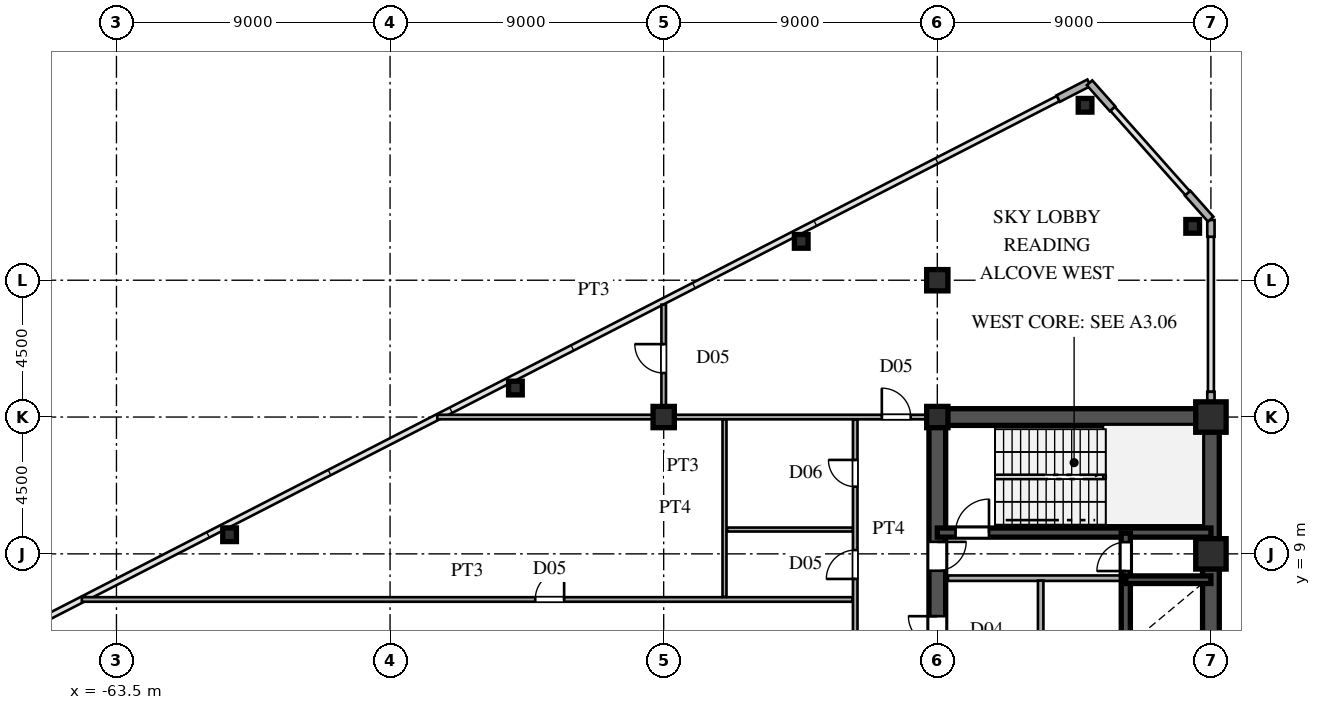
"""IFC4 building model, lengths in metres.
Left out: names, types, materials, properties, quantities, classifications, styles, units other than length and angle.
Written with IfcOpenShell. Run it as: python <this file> out.ifc"""

import sys

from ifc_helpers import new_model, si_unit, direction, frame, frame_2d, origin, origin_2d, place, context, subcontext, project, spatial, rectangle, hollow_rectangle, i_section, extrude, source, transform, mapped, element, fill, save


model = new_model("IFC4")
c1 = context("Model", 3, precision=1e-05, world=origin(), true_north=direction((0.0, 1.0)))
c2 = subcontext(c1, "Body", "Model", "MODEL_VIEW")
j1 = project(units=[si_unit("LENGTHUNIT", "METRE"), si_unit("PLANEANGLEUNIT", "RADIAN")], contexts=[c1])
p1 = place(None, origin())
s1 = spatial("IfcSite", under=j1, at=p1, CompositionType="ELEMENT")
p2 = place(p1, origin())
s2 = spatial("IfcBuilding", under=s1, at=p2, CompositionType="ELEMENT")
p3 = place(p2, frame((0.0, 0.0, 135.6)))
s3 = spatial("IfcBuildingStorey", under=s2, at=p3, CompositionType="ELEMENT", Elevation=135.6)
m1 = source(origin(), c2, "Body", "SweptSolid", [
    extrude(hollow_rectangle(XDim=1.0, YDim=1.0, WallThickness=0.042, at=origin_2d()), origin(), (0.0, 0.0, 1.0), 4.8),
])
for number, where, z_axis, x_axis in (
    (1, (-27.5, 9.0, 0.0), (0.0, 0.0, 1.0), (1.0, 0.0, 0.0)),
    (2, (-27.5, 13.5, 0.0), (0.0, 0.0, 1.0), (1.0, 0.0, 0.0)),
):
    element("IfcColumn", number, at=place(p3, frame(where, z_axis=z_axis, x_axis=x_axis)), inside=s3, PredefinedType="COLUMN", context=c2, shape_type="MappedRepresentation", body=[
        mapped(m1, transform((0.0, 0.0, 0.0), scale=1.0)),
    ])
m2 = source(origin(), c2, "Body", "SweptSolid", [
    extrude(i_section(OverallWidth=0.7, OverallDepth=0.7, WebThickness=0.028, FlangeThickness=0.045, at=origin_2d()), origin(), (0.0, 0.0, 1.0), 4.8),
])
for number, where, z_axis, x_axis in (
    (3, (-36.5, 13.5, 0.0), (0.0, 0.0, 1.0), (1.0, 0.0, 0.0)),
    (4, (-36.5, 18.0, 0.0), (0.0, 0.0, 1.0), (1.0, 0.0, 0.0)),
    (5, (-45.5, 13.5, 0.0), (0.0, 0.0, 1.0), (1.0, 0.0, 0.0)),
):
    element("IfcColumn", number, at=place(p3, frame(where, z_axis=z_axis, x_axis=x_axis)), inside=s3, PredefinedType="COLUMN", context=c2, shape_type="MappedRepresentation", body=[
        mapped(m2, transform((0.0, 0.0, 0.0), scale=1.0)),
    ])
m3 = source(origin(), c2, "Body", "SweptSolid", [
    extrude(hollow_rectangle(XDim=0.45, YDim=0.45, WallThickness=0.018, at=origin_2d()), origin(), (0.0, 0.0, 1.0), 4.8),
])
for number, where, z_axis, x_axis in (
    (6, (-28.1, 19.772, 0.0), (0.0, 0.0, 1.0), (1.0, 0.0, 0.0)),
    (7, (-31.64, 23.754, 0.0), (0.0, 0.0, 1.0), (1.0, 0.0, 0.0)),
    (8, (-40.976, 19.278, 0.0), (0.0, 0.0, 1.0), (1.0, 0.0, 0.0)),
    (9, (-50.377, 14.453, 0.0), (0.0, 0.0, 1.0), (1.0, 0.0, 0.0)),
    (10, (-59.779, 9.629, 0.0), (0.0, 0.0, 1.0), (1.0, 0.0, 0.0)),
):
    element("IfcColumn", number, at=place(p3, frame(where, z_axis=z_axis, x_axis=x_axis)), inside=s3, PredefinedType="COLUMN", context=c2, shape_type="MappedRepresentation", body=[
        mapped(m3, transform((0.0, 0.0, 0.0), scale=1.0)),
    ])
p4 = place(p3, frame((-27.5, 13.78, 0.0), z_axis=(0.0, 0.0, 1.0), x_axis=(0.0, 1.0, 0.0)))
e11 = element("IfcWall", 11, at=p4, inside=s3, PredefinedType="SOLIDWALL", context=c2, shape_type="SweptSolid", body=[
    extrude(rectangle(XDim=0.55, YDim=0.24, at=frame_2d((0.275, 0.0))), origin(), (0.0, 0.0, 1.0), 4.08),
])
p5 = place(p3, frame((-27.5, 19.43, 0.0), z_axis=(0.0, 0.0, 1.0), x_axis=(0.0, 1.0, 0.0)))
e12 = element("IfcWall", 12, at=p5, inside=s3, PredefinedType="SOLIDWALL", context=c2, shape_type="SweptSolid", body=[
    extrude(rectangle(XDim=0.55, YDim=0.24, at=frame_2d((0.275, 0.0))), origin(), (0.0, 0.0, 1.0), 4.58),
])
for number, where, z_axis, x_axis in (
    (13, (-27.507, 20.008, 0.0), (0.0, 0.0, 1.0), (-0.664, 0.747, 0.0)),
    (14, (-30.736, 23.64, 0.0), (0.0, 0.0, 1.0), (-0.664, 0.747, 0.0)),
):
    element("IfcWall", number, at=place(p3, frame(where, z_axis=z_axis, x_axis=x_axis)), inside=s3, PredefinedType="SOLIDWALL", context=c2, shape_type="SweptSolid", body=[
        extrude(rectangle(XDim=1.14, YDim=0.24, at=frame_2d((0.57, 0.0))), origin(), (0.0, 0.0, 1.0), 4.58),
    ])
p6 = place(p3, frame((-31.509, 24.495, 0.0), z_axis=(0.0, 0.0, 1.0), x_axis=(-0.889797395748, -0.456355776255, 0.0)))
e15 = element("IfcWall", 15, at=p6, inside=s3, PredefinedType="SOLIDWALL", context=c2, shape_type="SweptSolid", body=[
    extrude(rectangle(XDim=1.14, YDim=0.24, at=frame_2d((0.57, 0.0))), origin(), (0.0, 0.0, 1.0), 4.58),
])
p7 = place(p3, frame((-27.5, 1.3, 0.0), z_axis=(0.0, 0.0, 1.0), x_axis=(0.0, 1.0, 0.0)))
e16 = element("IfcWall", 16, at=p7, inside=s3, PredefinedType="SHEAR", context=c2, shape_type="SweptSolid", body=[
    extrude(rectangle(XDim=12.2, YDim=0.55, at=frame_2d((6.1, 0.0))), origin(), (0.0, 0.0, 1.0), 4.58),
])
p8 = place(p3, frame((-36.5, 13.5, 0.0), z_axis=(0.0, 0.0, 1.0), x_axis=(1.0, 0.0, 0.0)))
e17 = element("IfcWall", 17, at=p8, inside=s3, PredefinedType="SHEAR", context=c2, shape_type="SweptSolid", body=[
    extrude(rectangle(XDim=9.0, YDim=0.55, at=frame_2d((4.5, 0.0))), origin(), (0.0, 0.0, 1.0), 4.58),
])
p9 = place(p3, frame((-36.5, 8.2, 0.0), z_axis=(0.0, 0.0, 1.0), x_axis=(0.0, 1.0, 0.0)))
e18 = element("IfcWall", 18, at=p9, inside=s3, PredefinedType="SHEAR", context=c2, shape_type="SweptSolid", body=[
    extrude(rectangle(XDim=5.45, YDim=0.55, at=frame_2d((2.725, 0.0))), origin(), (0.0, 0.0, 1.0), 4.58),
])
p10 = place(p9, frame((0.245, 0.0, 0.0)))
e19 = element("IfcOpeningElement", 19, at=p10, cuts=e18, PredefinedType="OPENING", context=c2, shape_type="SweptSolid", body=[
    extrude(rectangle(XDim=0.95, YDim=2.15, at=frame_2d((0.475, 1.075))), frame((0.0, 0.285, 0.0), z_axis=(0.0, -1.0, 0.0), x_axis=(1.0, 0.0, 0.0)), (0.0, 0.0, 1.0), 0.57),
])
p11 = place(p3, frame((-36.5, 4.75, 0.0), z_axis=(0.0, 0.0, 1.0), x_axis=(0.0, 1.0, 0.0)))
e20 = element("IfcWall", 20, at=p11, inside=s3, PredefinedType="SHEAR", context=c2, shape_type="SweptSolid", body=[
    extrude(rectangle(XDim=3.45, YDim=0.55, at=frame_2d((1.725, 0.0))), origin(), (0.0, 0.0, 1.0), 4.58),
])
p12 = place(p11, frame((1.25, 0.0, 0.0)))
e21 = element("IfcOpeningElement", 21, at=p12, cuts=e20, PredefinedType="OPENING", context=c2, shape_type="SweptSolid", body=[
    extrude(rectangle(XDim=0.95, YDim=2.15, at=frame_2d((0.475, 1.075))), frame((0.0, 0.285, 0.0), z_axis=(0.0, -1.0, 0.0), x_axis=(1.0, 0.0, 0.0)), (0.0, 0.0, 1.0), 0.57),
])
p13 = place(p3, frame((-36.5, 9.7, 0.0), z_axis=(0.0, 0.0, 1.0), x_axis=(1.0, 0.0, 0.0)))
e22 = element("IfcWall", 22, at=p13, inside=s3, PredefinedType="SHEAR", context=c2, shape_type="SweptSolid", body=[
    extrude(rectangle(XDim=9.0, YDim=0.3, at=frame_2d((4.5, 0.0))), origin(), (0.0, 0.0, 1.0), 4.58),
])
p14 = place(p13, frame((0.6, 0.0, 0.0)))
e23 = element("IfcOpeningElement", 23, at=p14, cuts=e22, PredefinedType="OPENING", context=c2, shape_type="SweptSolid", body=[
    extrude(rectangle(XDim=1.1, YDim=2.2, at=frame_2d((0.55, 1.1))), frame((0.0, 0.16, 0.0), z_axis=(0.0, -1.0, 0.0), x_axis=(1.0, 0.0, 0.0)), (0.0, 0.0, 1.0), 0.32),
])
p15 = place(p3, frame((-30.3, 8.15, 0.0), z_axis=(0.0, 0.0, 1.0), x_axis=(1.0, 0.0, 0.0)))
e24 = element("IfcWall", 24, at=p15, inside=s3, PredefinedType="SHEAR", context=c2, shape_type="SweptSolid", body=[
    extrude(rectangle(XDim=2.8, YDim=0.25, at=frame_2d((1.4, 0.0))), origin(), (0.0, 0.0, 1.0), 4.58),
])
p16 = place(p3, frame((-30.3, 5.9, 0.0), z_axis=(0.0, 0.0, 1.0), x_axis=(0.0, 1.0, 0.0)))
e25 = element("IfcWall", 25, at=p16, inside=s3, PredefinedType="SHEAR", context=c2, shape_type="SweptSolid", body=[
    extrude(rectangle(XDim=2.25, YDim=0.3, at=frame_2d((1.125, 0.0))), origin(), (0.0, 0.0, 1.0), 4.58),
])
p17 = place(p3, frame((-30.3, 8.15, 0.0), z_axis=(0.0, 0.0, 1.0), x_axis=(0.0, 1.0, 0.0)))
e26 = element("IfcWall", 26, at=p17, inside=s3, PredefinedType="SHEAR", context=c2, shape_type="SweptSolid", body=[
    extrude(rectangle(XDim=1.53, YDim=0.3, at=frame_2d((0.765, 0.0))), origin(), (0.0, 0.0, 1.0), 4.58),
])
p18 = place(p17, frame((0.285, 0.0, 0.0)))
e27 = element("IfcOpeningElement", 27, at=p18, cuts=e26, PredefinedType="OPENING", context=c2, shape_type="SweptSolid", body=[
    extrude(rectangle(XDim=0.95, YDim=2.15, at=frame_2d((0.475, 1.075))), frame((0.0, 0.16, 0.0), z_axis=(0.0, -1.0, 0.0), x_axis=(1.0, 0.0, 0.0)), (0.0, 0.0, 1.0), 0.32),
])
p19 = place(p3, frame((-36.15, 8.2, 0.0), z_axis=(0.0, 0.0, 1.0), x_axis=(1.0, 0.0, 0.0)))
e28 = element("IfcWall", 28, at=p19, inside=s3, PredefinedType="PARTITIONING", context=c2, shape_type="SweptSolid", body=[
    extrude(rectangle(XDim=5.7, YDim=0.18, at=frame_2d((2.85, 0.0))), origin(), (0.0, 0.0, 1.0), 4.58),
])
p20 = place(p3, frame((-33.1, 1.38, 0.0), z_axis=(0.0, 0.0, 1.0), x_axis=(0.0, 1.0, 0.0)))
e29 = element("IfcWall", 29, at=p20, inside=s3, PredefinedType="PARTITIONING", context=c2, shape_type="SweptSolid", body=[
    extrude(rectangle(XDim=6.74, YDim=0.18, at=frame_2d((3.37, 0.0))), origin(), (0.0, 0.0, 1.0), 4.58),
])
p21 = place(p3, frame((-64.639, 7.5, 0.0), z_axis=(0.0, 0.0, 1.0), x_axis=(1.0, 0.0, 0.0)))
e30 = element("IfcWall", 30, at=p21, inside=s3, PredefinedType="PARTITIONING", context=c2, shape_type="SweptSolid", body=[
    extrude(rectangle(XDim=25.354, YDim=0.15, at=frame_2d((12.677, 0.0))), origin(), (0.0, 0.0, 1.0), 4.58),
])
p22 = place(p21, frame((14.914, 0.0, 0.0)))
e31 = element("IfcOpeningElement", 31, at=p22, cuts=e30, PredefinedType="OPENING", context=c2, shape_type="SweptSolid", body=[
    extrude(rectangle(XDim=0.95, YDim=2.15, at=frame_2d((0.475, 1.075))), frame((0.0, 0.085, 0.0), z_axis=(0.0, -1.0, 0.0), x_axis=(1.0, 0.0, 0.0)), (0.0, 0.0, 1.0), 0.17),
])
p23 = place(p3, frame((-43.415, 9.8, 0.0), z_axis=(0.0, 0.0, 1.0), x_axis=(1.0, 0.0, 0.0)))
e32 = element("IfcWall", 32, at=p23, inside=s3, PredefinedType="PARTITIONING", context=c2, shape_type="SweptSolid", body=[
    extrude(rectangle(XDim=4.13, YDim=0.13, at=frame_2d((2.065, 0.0))), origin(), (0.0, 0.0, 1.0), 4.58),
])
p24 = place(p3, frame((-52.947, 13.5, 0.0), z_axis=(0.0, 0.0, 1.0), x_axis=(1.0, 0.0, 0.0)))
e33 = element("IfcWall", 33, at=p24, inside=s3, PredefinedType="PARTITIONING", context=c2, shape_type="SweptSolid", body=[
    extrude(rectangle(XDim=16.167, YDim=0.15, at=frame_2d((8.083, 0.0))), origin(), (0.0, 0.0, 1.0), 3.98),
])
p25 = place(p24, frame((14.622, 0.0, 0.0)))
e34 = element("IfcOpeningElement", 34, at=p25, cuts=e33, PredefinedType="OPENING", context=c2, shape_type="SweptSolid", body=[
    extrude(rectangle(XDim=0.95, YDim=2.15, at=frame_2d((0.475, 1.075))), frame((0.0, 0.085, 0.0), z_axis=(0.0, -1.0, 0.0), x_axis=(1.0, 0.0, 0.0)), (0.0, 0.0, 1.0), 0.17),
])
p26 = place(p3, frame((-45.5, 13.585, 0.0), z_axis=(0.0, 0.0, 1.0), x_axis=(0.0, 1.0, 0.0)))
e35 = element("IfcWall", 35, at=p26, inside=s3, PredefinedType="PARTITIONING", context=c2, shape_type="SweptSolid", body=[
    extrude(rectangle(XDim=3.611, YDim=0.15, at=frame_2d((1.806, 0.0))), origin(), (0.0, 0.0, 1.0), 4.58),
])
p27 = place(p26, frame((1.363, 0.0, 0.0)))
e36 = element("IfcOpeningElement", 36, at=p27, cuts=e35, PredefinedType="OPENING", context=c2, shape_type="SweptSolid", body=[
    extrude(rectangle(XDim=0.95, YDim=2.15, at=frame_2d((0.475, 1.075))), frame((0.0, 0.085, 0.0), z_axis=(0.0, -1.0, 0.0), x_axis=(1.0, 0.0, 0.0)), (0.0, 0.0, 1.0), 0.17),
])
p28 = place(p3, frame((-43.5, 7.585, 0.0), z_axis=(0.0, 0.0, 1.0), x_axis=(0.0, 1.0, 0.0)))
e37 = element("IfcWall", 37, at=p28, inside=s3, PredefinedType="PARTITIONING", context=c2, shape_type="SweptSolid", body=[
    extrude(rectangle(XDim=5.83, YDim=0.13, at=frame_2d((2.915, 0.0))), origin(), (0.0, 0.0, 1.0), 4.58),
])
p29 = place(p3, frame((-39.2, -13.415, 0.0), z_axis=(0.0, 0.0, 1.0), x_axis=(0.0, 1.0, 0.0)))
e38 = element("IfcWall", 38, at=p29, inside=s3, PredefinedType="PARTITIONING", context=c2, shape_type="SweptSolid", body=[
    extrude(rectangle(XDim=26.83, YDim=0.15, at=frame_2d((13.415, 0.0))), origin(), (0.0, 0.0, 1.0), 4.58),
])
p30 = place(p29, frame((12.94, 0.0, 0.0)))
e39 = element("IfcOpeningElement", 39, at=p30, cuts=e38, PredefinedType="OPENING", context=c2, shape_type="SweptSolid", body=[
    extrude(rectangle(XDim=0.95, YDim=2.15, at=frame_2d((0.475, 1.075))), frame((0.0, 0.085, 0.0), z_axis=(0.0, -1.0, 0.0), x_axis=(1.0, 0.0, 0.0)), (0.0, 0.0, 1.0), 0.17),
])
p31 = place(p29, frame((1.325, 0.0, 0.0)))
e40 = element("IfcOpeningElement", 40, at=p31, cuts=e38, PredefinedType="OPENING", context=c2, shape_type="SweptSolid", body=[
    extrude(rectangle(XDim=0.88, YDim=2.1, at=frame_2d((0.44, 1.05))), frame((0.0, 0.085, 0.0), z_axis=(0.0, -1.0, 0.0), x_axis=(1.0, 0.0, 0.0)), (0.0, 0.0, 1.0), 0.17),
])
p32 = place(p29, frame((4.29, 0.0, 0.0)))
e41 = element("IfcOpeningElement", 41, at=p32, cuts=e38, PredefinedType="OPENING", context=c2, shape_type="SweptSolid", body=[
    extrude(rectangle(XDim=0.95, YDim=2.15, at=frame_2d((0.475, 1.075))), frame((0.0, 0.085, 0.0), z_axis=(0.0, -1.0, 0.0), x_axis=(1.0, 0.0, 0.0)), (0.0, 0.0, 1.0), 0.17),
])
p33 = place(p29, frame((21.59, 0.0, 0.0)))
e42 = element("IfcOpeningElement", 42, at=p33, cuts=e38, PredefinedType="OPENING", context=c2, shape_type="SweptSolid", body=[
    extrude(rectangle(XDim=0.95, YDim=2.15, at=frame_2d((0.475, 1.075))), frame((0.0, 0.085, 0.0), z_axis=(0.0, -1.0, 0.0), x_axis=(1.0, 0.0, 0.0)), (0.0, 0.0, 1.0), 0.17),
])
p34 = place(p29, frame((24.625, 0.0, 0.0)))
e43 = element("IfcOpeningElement", 43, at=p34, cuts=e38, PredefinedType="OPENING", context=c2, shape_type="SweptSolid", body=[
    extrude(rectangle(XDim=0.88, YDim=2.1, at=frame_2d((0.44, 1.05))), frame((0.0, 0.085, 0.0), z_axis=(0.0, -1.0, 0.0), x_axis=(1.0, 0.0, 0.0)), (0.0, 0.0, 1.0), 0.17),
])
m4 = source(origin(), c2, "Body", "SweptSolid", [
    extrude(rectangle(XDim=0.95, YDim=2.15, at=frame_2d((0.475, 1.075))), frame((0.0, 0.025, 0.0), z_axis=(0.0, -1.0, 0.0), x_axis=(1.0, 0.0, 0.0)), (0.0, 0.0, 1.0), 0.05),
])
p35 = place(p10, frame((0.95, 0.0, 0.0), z_axis=(0.0, 0.0, 1.0), x_axis=(-1.0, 0.0, 0.0)))
e44 = element("IfcDoor", 44, at=p35, inside=s3, OperationType="SINGLE_SWING_RIGHT", PredefinedType="DOOR", context=c2, shape_type="MappedRepresentation", body=[
    mapped(m4, transform((0.0, 0.0, 0.0), scale=1.0)),
])
fill(e19, e44)
p36 = place(p12, origin())
e45 = element("IfcDoor", 45, at=p36, inside=s3, OperationType="SINGLE_SWING_RIGHT", PredefinedType="DOOR", context=c2, shape_type="MappedRepresentation", body=[
    mapped(m4, transform((0.0, 0.0, 0.0), scale=1.0)),
])
fill(e21, e45)
m5 = source(origin(), c2, "Body", "SweptSolid", [
    extrude(rectangle(XDim=1.1, YDim=2.2, at=frame_2d((0.55, 1.1))), frame((0.0, 0.025, 0.0), z_axis=(0.0, -1.0, 0.0), x_axis=(1.0, 0.0, 0.0)), (0.0, 0.0, 1.0), 0.05),
])
p37 = place(p14, origin())
e46 = element("IfcDoor", 46, at=p37, inside=s3, OperationType="SINGLE_SWING_RIGHT", PredefinedType="DOOR", context=c2, shape_type="MappedRepresentation", body=[
    mapped(m5, transform((0.0, 0.0, 0.0), scale=1.0)),
])
fill(e23, e46)
p38 = place(p18, origin())
e47 = element("IfcDoor", 47, at=p38, inside=s3, OperationType="SINGLE_SWING_LEFT", PredefinedType="DOOR", context=c2, shape_type="MappedRepresentation", body=[
    mapped(m4, transform((0.0, 0.0, 0.0), scale=1.0)),
])
fill(e27, e47)
m6 = source(origin(), c2, "Body", "SweptSolid", [
    extrude(rectangle(XDim=0.95, YDim=2.15, at=frame_2d((0.475, 1.075))), frame((0.0, 0.025, 0.0), z_axis=(0.0, -1.0, 0.0), x_axis=(1.0, 0.0, 0.0)), (0.0, 0.0, 1.0), 0.05),
])
p39 = place(p22, origin())
e48 = element("IfcDoor", 48, at=p39, inside=s3, OperationType="SINGLE_SWING_RIGHT", PredefinedType="DOOR", context=c2, shape_type="MappedRepresentation", body=[
    mapped(m6, transform((0.0, 0.0, 0.0), scale=1.0)),
])
fill(e31, e48)
p40 = place(p25, origin())
e49 = element("IfcDoor", 49, at=p40, inside=s3, OperationType="SINGLE_SWING_LEFT", PredefinedType="DOOR", context=c2, shape_type="MappedRepresentation", body=[
    mapped(m6, transform((0.0, 0.0, 0.0), scale=1.0)),
])
fill(e34, e49)
p41 = place(p27, origin())
e50 = element("IfcDoor", 50, at=p41, inside=s3, OperationType="SINGLE_SWING_RIGHT", PredefinedType="DOOR", context=c2, shape_type="MappedRepresentation", body=[
    mapped(m6, transform((0.0, 0.0, 0.0), scale=1.0)),
])
fill(e36, e50)
p42 = place(p33, origin())
e51 = element("IfcDoor", 51, at=p42, inside=s3, OperationType="SINGLE_SWING_LEFT", PredefinedType="DOOR", context=c2, shape_type="MappedRepresentation", body=[
    mapped(m6, transform((0.0, 0.0, 0.0), scale=1.0)),
])
fill(e42, e51)
m7 = source(origin(), c2, "Body", "SweptSolid", [
    extrude(rectangle(XDim=0.88, YDim=2.1, at=frame_2d((0.44, 1.05))), frame((0.0, 0.025, 0.0), z_axis=(0.0, -1.0, 0.0), x_axis=(1.0, 0.0, 0.0)), (0.0, 0.0, 1.0), 0.05),
])
p43 = place(p34, origin())
e52 = element("IfcDoor", 52, at=p43, inside=s3, OperationType="SINGLE_SWING_RIGHT", PredefinedType="DOOR", context=c2, shape_type="MappedRepresentation", body=[
    mapped(m7, transform((0.0, 0.0, 0.0), scale=1.0)),
])
fill(e43, e52)
save(model, sys.argv[1])
